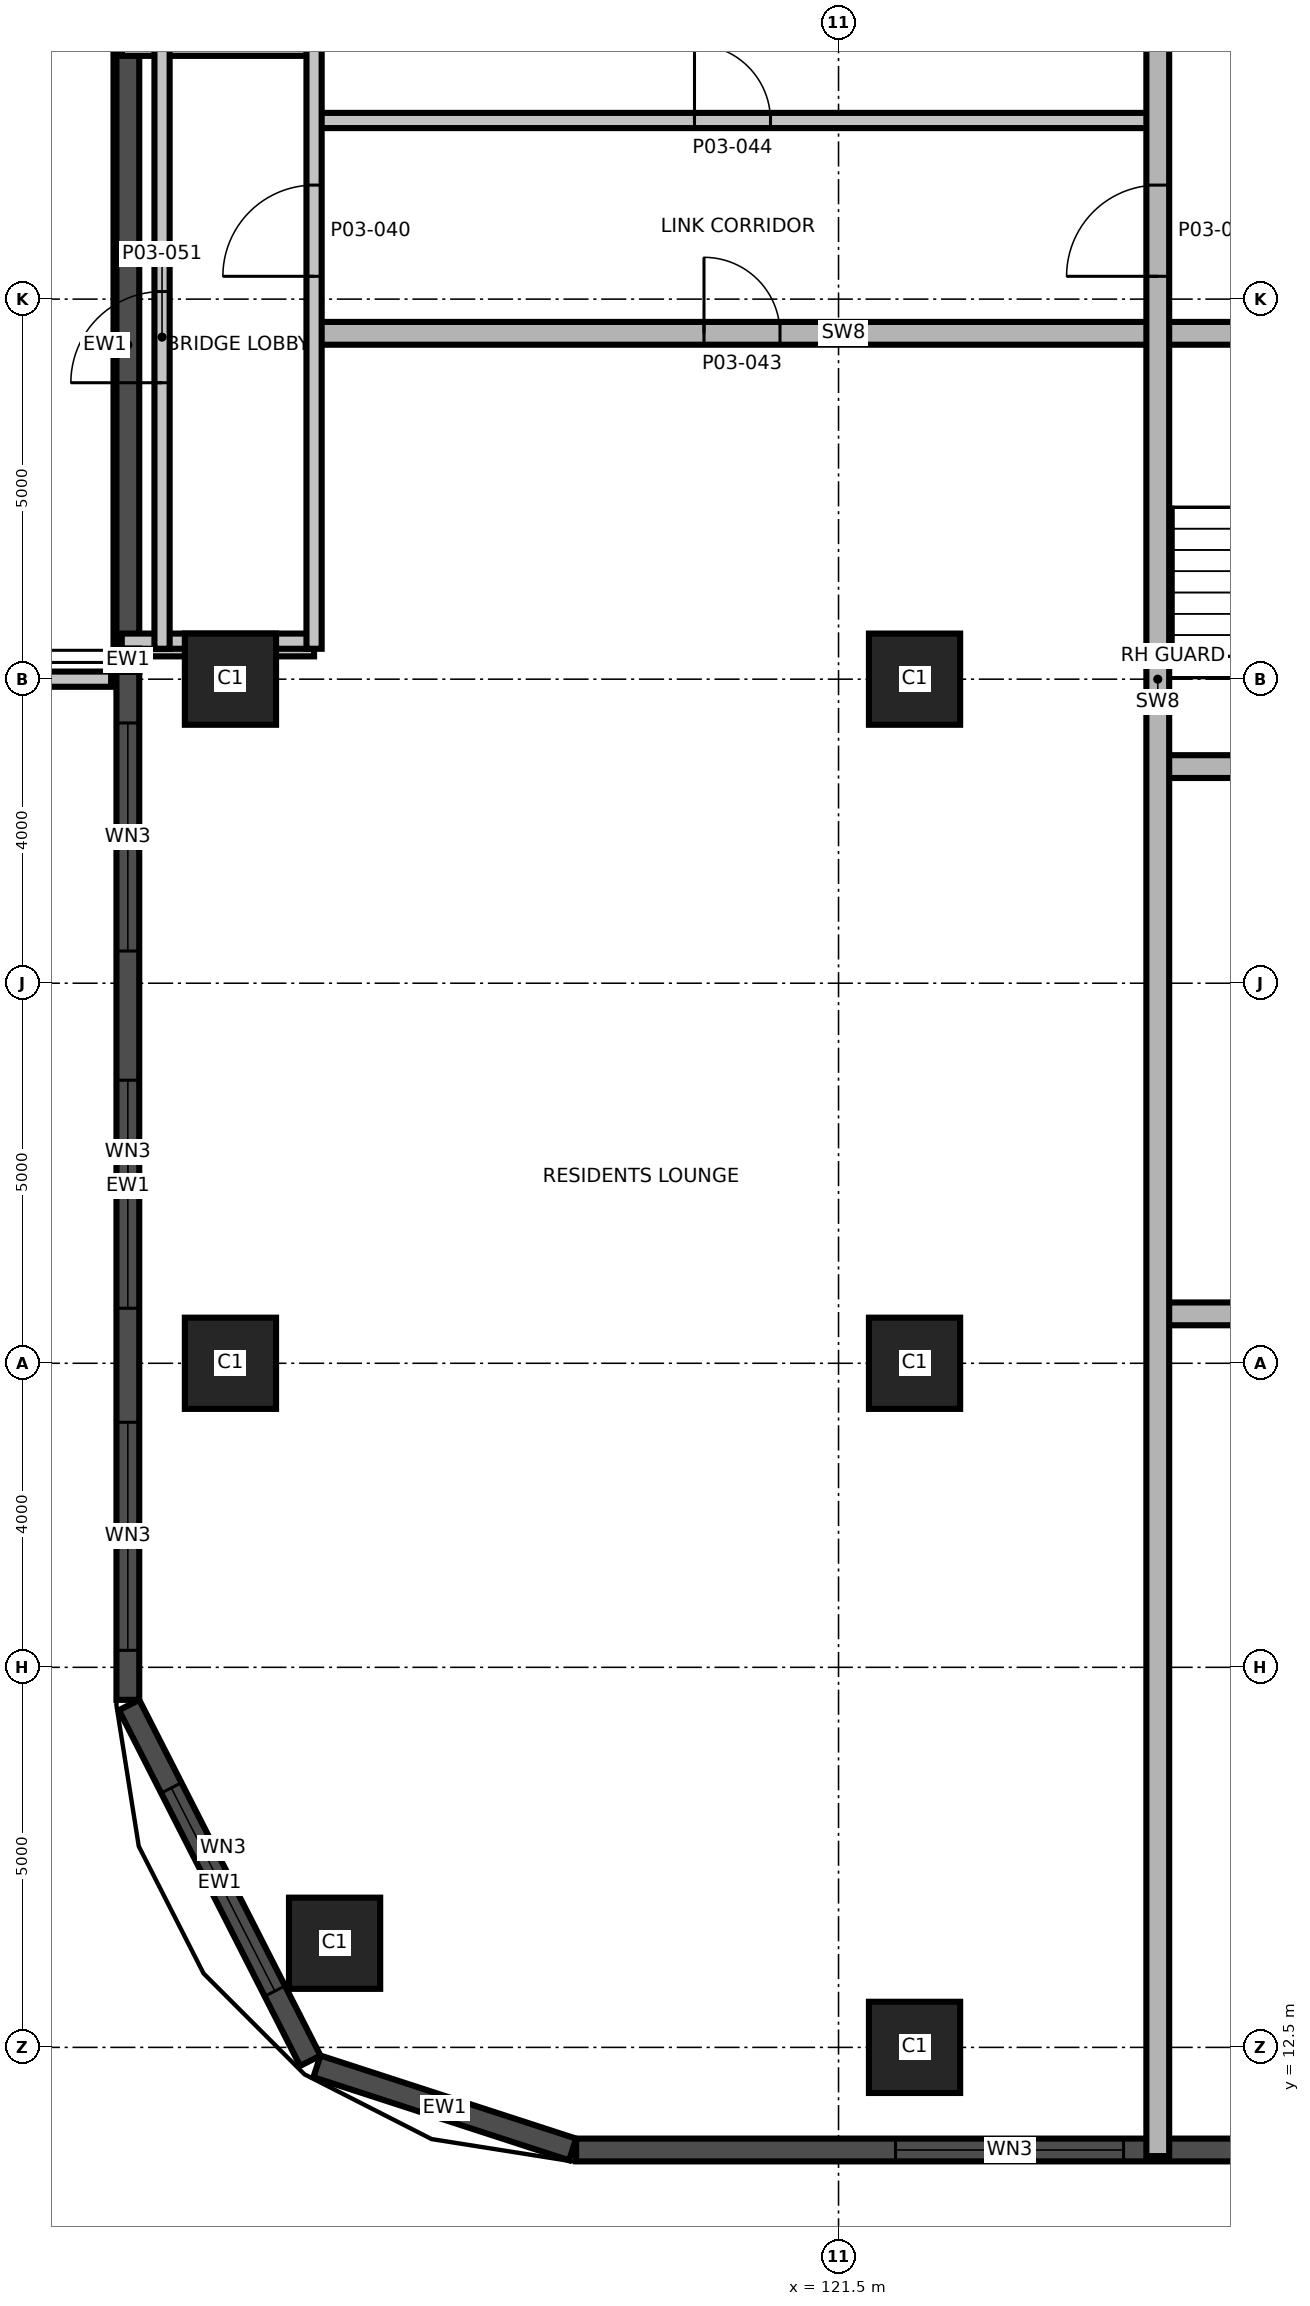
"""IFC4 building model, lengths in metres.
Left out: names, types, materials, properties, quantities, classifications, styles, units other than length and angle.
Written with IfcOpenShell. Run it as: python <this file> out.ifc"""

import sys

from ifc_helpers import new_model, si_unit, direction, frame, frame_2d, origin, origin_2d, place, context, subcontext, project, spatial, rectangle, extrude, element, fill, save


model = new_model("IFC4")
c1 = context("Model", 3, precision=1e-05, world=origin(), true_north=direction((0.0, 1.0)))
c2 = subcontext(c1, "Body", "Model", "MODEL_VIEW")
j1 = project(units=[si_unit("LENGTHUNIT", "METRE"), si_unit("PLANEANGLEUNIT", "RADIAN")], contexts=[c1])
p1 = place(None, origin())
s1 = spatial("IfcSite", under=j1, at=p1, CompositionType="ELEMENT")
p2 = place(p1, origin())
s2 = spatial("IfcBuilding", under=s1, at=p2, CompositionType="ELEMENT")
p3 = place(p2, frame((0.0, 0.0, 18.5)))
s3 = spatial("IfcBuildingStorey", under=s2, at=p3, CompositionType="ELEMENT", Elevation=18.5)
for number, where, z_axis, x_axis in (
    (1, (122.5, 12.5, 0.0), (0.0, 0.0, 1.0), (1.0, 0.0, 0.0)),
    (2, (114.87, 13.87, 0.0), (0.0, 0.0, 1.0), (1.0, 0.0, 0.0)),
    (3, (113.5, 21.5, 0.0), (0.0, 0.0, 1.0), (1.0, 0.0, 0.0)),
    (4, (122.5, 21.5, 0.0), (0.0, 0.0, 1.0), (1.0, 0.0, 0.0)),
    (5, (113.5, 30.5, 0.0), (0.0, 0.0, 1.0), (1.0, 0.0, 0.0)),
    (6, (122.5, 30.5, 0.0), (0.0, 0.0, 1.0), (1.0, 0.0, 0.0)),
):
    element("IfcColumn", number, at=place(p3, frame(where, z_axis=z_axis, x_axis=x_axis)), inside=s3, PredefinedType="COLUMN", context=c2, shape_type="SweptSolid", body=[
        extrude(rectangle(XDim=1.2, YDim=1.2, at=origin_2d()), origin(), (0.0, 0.0, 1.0), 5.0),
    ])
p4 = place(p3, frame((112.166, 17.004, 0.0), z_axis=(0.0, 0.0, 1.0), x_axis=(0.454006562826, -0.890998339455, 0.0)))
e7 = element("IfcWall", 7, at=p4, inside=s3, PredefinedType="SOLIDWALL", context=c2, shape_type="SweptSolid", body=[
    extrude(rectangle(XDim=5.252, YDim=0.3, at=frame_2d((2.626, 0.0))), origin(), (0.0, 0.0, 1.0), 4.7),
])
p5 = place(p4, frame((1.224, 0.0, 0.9)))
e8 = element("IfcOpeningElement", 8, at=p5, cuts=e7, PredefinedType="OPENING", context=c2, shape_type="SweptSolid", body=[
    extrude(rectangle(XDim=3.0, YDim=2.4, at=frame_2d((1.5, 1.2))), frame((0.0, 0.16, 0.0), z_axis=(0.0, -1.0, 0.0), x_axis=(1.0, 0.0, 0.0)), (0.0, 0.0, 1.0), 0.32),
])
p6 = place(p3, frame((114.638, 12.25, 0.0), z_axis=(0.0, 0.0, 1.0), x_axis=(0.951038127287, -0.309073584194, 0.0)))
e9 = element("IfcWall", 9, at=p6, inside=s3, PredefinedType="SOLIDWALL", context=c2, shape_type="SweptSolid", body=[
    extrude(rectangle(XDim=3.536, YDim=0.3, at=frame_2d((1.768, 0.0))), origin(), (0.0, 0.0, 1.0), 4.7),
])
p7 = place(p3, frame((118.048, 11.15, 0.0), z_axis=(0.0, 0.0, 1.0), x_axis=(1.0, 0.0, 0.0)))
e10 = element("IfcWall", 10, at=p7, inside=s3, PredefinedType="SOLIDWALL", context=c2, shape_type="SweptSolid", body=[
    extrude(rectangle(XDim=35.88, YDim=0.3, at=frame_2d((17.94, 0.0))), origin(), (0.0, 0.0, 1.0), 4.7),
])
p8 = place(p7, frame((4.202, 0.0, 0.9)))
e11 = element("IfcOpeningElement", 11, at=p8, cuts=e10, PredefinedType="OPENING", context=c2, shape_type="SweptSolid", body=[
    extrude(rectangle(XDim=3.0, YDim=2.4, at=frame_2d((1.5, 1.2))), frame((0.0, 0.16, 0.0), z_axis=(0.0, -1.0, 0.0), x_axis=(1.0, 0.0, 0.0)), (0.0, 0.0, 1.0), 0.32),
])
p9 = place(p7, frame((8.702, 0.0, 0.9)))
e12 = element("IfcOpeningElement", 12, at=p9, cuts=e10, PredefinedType="OPENING", context=c2, shape_type="SweptSolid", body=[
    extrude(rectangle(XDim=3.0, YDim=2.4, at=frame_2d((1.5, 1.2))), frame((0.0, 0.16, 0.0), z_axis=(0.0, -1.0, 0.0), x_axis=(1.0, 0.0, 0.0)), (0.0, 0.0, 1.0), 0.32),
])
p10 = place(p7, frame((13.202, 0.0, 0.9)))
e13 = element("IfcOpeningElement", 13, at=p10, cuts=e10, PredefinedType="OPENING", context=c2, shape_type="SweptSolid", body=[
    extrude(rectangle(XDim=3.0, YDim=2.4, at=frame_2d((1.5, 1.2))), frame((0.0, 0.16, 0.0), z_axis=(0.0, -1.0, 0.0), x_axis=(1.0, 0.0, 0.0)), (0.0, 0.0, 1.0), 0.32),
])
p11 = place(p7, frame((17.702, 0.0, 0.9)))
e14 = element("IfcOpeningElement", 14, at=p11, cuts=e10, PredefinedType="OPENING", context=c2, shape_type="SweptSolid", body=[
    extrude(rectangle(XDim=3.0, YDim=2.4, at=frame_2d((1.5, 1.2))), frame((0.0, 0.16, 0.0), z_axis=(0.0, -1.0, 0.0), x_axis=(1.0, 0.0, 0.0)), (0.0, 0.0, 1.0), 0.32),
])
p12 = place(p7, frame((22.202, 0.0, 0.9)))
e15 = element("IfcOpeningElement", 15, at=p12, cuts=e10, PredefinedType="OPENING", context=c2, shape_type="SweptSolid", body=[
    extrude(rectangle(XDim=3.0, YDim=2.4, at=frame_2d((1.5, 1.2))), frame((0.0, 0.16, 0.0), z_axis=(0.0, -1.0, 0.0), x_axis=(1.0, 0.0, 0.0)), (0.0, 0.0, 1.0), 0.32),
])
p13 = place(p7, frame((31.726, 0.0, 0.9)))
e16 = element("IfcOpeningElement", 16, at=p13, cuts=e10, PredefinedType="OPENING", context=c2, shape_type="SweptSolid", body=[
    extrude(rectangle(XDim=3.0, YDim=2.4, at=frame_2d((1.5, 1.2))), frame((0.0, 0.16, 0.0), z_axis=(0.0, -1.0, 0.0), x_axis=(1.0, 0.0, 0.0)), (0.0, 0.0, 1.0), 0.32),
])
p14 = place(p3, frame((112.15, 38.9, 3.15), z_axis=(0.0, 0.0, 1.0), x_axis=(0.0, -1.0, 0.0)))
e17 = element("IfcWall", 17, at=p14, inside=s3, PredefinedType="SOLIDWALL", context=c2, shape_type="SweptSolid", body=[
    extrude(rectangle(XDim=8.0, YDim=0.3, at=frame_2d((4.0, 0.0))), origin(), (0.0, 0.0, 1.0), 1.55),
])
p15 = place(p3, frame((112.15, 30.6, 0.0), z_axis=(0.0, 0.0, 1.0), x_axis=(0.0, -1.0, 0.0)))
e18 = element("IfcWall", 18, at=p15, inside=s3, PredefinedType="SOLIDWALL", context=c2, shape_type="SweptSolid", body=[
    extrude(rectangle(XDim=13.528, YDim=0.3, at=frame_2d((6.764, 0.0))), origin(), (0.0, 0.0, 1.0), 4.7),
])
p16 = place(p15, frame((0.676, 0.0, 0.9)))
e19 = element("IfcOpeningElement", 19, at=p16, cuts=e18, PredefinedType="OPENING", context=c2, shape_type="SweptSolid", body=[
    extrude(rectangle(XDim=3.0, YDim=2.4, at=frame_2d((1.5, 1.2))), frame((0.0, 0.16, 0.0), z_axis=(0.0, -1.0, 0.0), x_axis=(1.0, 0.0, 0.0)), (0.0, 0.0, 1.0), 0.32),
])
p17 = place(p15, frame((5.376, 0.0, 0.9)))
e20 = element("IfcOpeningElement", 20, at=p17, cuts=e18, PredefinedType="OPENING", context=c2, shape_type="SweptSolid", body=[
    extrude(rectangle(XDim=3.0, YDim=2.4, at=frame_2d((1.5, 1.2))), frame((0.0, 0.16, 0.0), z_axis=(0.0, -1.0, 0.0), x_axis=(1.0, 0.0, 0.0)), (0.0, 0.0, 1.0), 0.32),
])
p18 = place(p15, frame((9.876, 0.0, 0.9)))
e21 = element("IfcOpeningElement", 21, at=p18, cuts=e18, PredefinedType="OPENING", context=c2, shape_type="SweptSolid", body=[
    extrude(rectangle(XDim=3.0, YDim=2.4, at=frame_2d((1.5, 1.2))), frame((0.0, 0.16, 0.0), z_axis=(0.0, -1.0, 0.0), x_axis=(1.0, 0.0, 0.0)), (0.0, 0.0, 1.0), 0.32),
])
p19 = place(p3, frame((125.75, 22.15, 0.0), z_axis=(0.0, 0.0, 1.0), x_axis=(1.0, 0.0, 0.0)))
e22 = element("IfcWall", 22, at=p19, inside=s3, PredefinedType="SHEAR", context=c2, shape_type="SweptSolid", body=[
    extrude(rectangle(XDim=21.5, YDim=0.3, at=frame_2d((10.75, 0.0))), origin(), (0.0, 0.0, 1.0), 4.7),
])
p20 = place(p19, frame((17.0, 0.0, 0.0)))
e23 = element("IfcOpeningElement", 23, at=p20, cuts=e22, PredefinedType="OPENING", context=c2, shape_type="SweptSolid", body=[
    extrude(rectangle(XDim=1.0, YDim=2.1, at=frame_2d((0.5, 1.05))), frame((0.0, 0.16, 0.0), z_axis=(0.0, -1.0, 0.0), x_axis=(1.0, 0.0, 0.0)), (0.0, 0.0, 1.0), 0.32),
])
p21 = place(p19, frame((6.75, 0.0, 0.0)))
e24 = element("IfcOpeningElement", 24, at=p21, cuts=e22, PredefinedType="OPENING", context=c2, shape_type="SweptSolid", body=[
    extrude(rectangle(XDim=1.6, YDim=2.1, at=frame_2d((0.8, 1.05))), frame((0.0, 0.16, 0.0), z_axis=(0.0, -1.0, 0.0), x_axis=(1.0, 0.0, 0.0)), (0.0, 0.0, 1.0), 0.32),
])
p22 = place(p3, frame((125.7, 29.35, 0.0), z_axis=(0.0, 0.0, 1.0), x_axis=(1.0, 0.0, 0.0)))
e25 = element("IfcWall", 25, at=p22, inside=s3, PredefinedType="SHEAR", context=c2, shape_type="SweptSolid", body=[
    extrude(rectangle(XDim=2.83, YDim=0.3, at=frame_2d((1.415, 0.0))), origin(), (0.0, 0.0, 1.0), 4.7),
])
p23 = place(p22, frame((0.975, 0.0, 0.0)))
e26 = element("IfcOpeningElement", 26, at=p23, cuts=e25, PredefinedType="OPENING", context=c2, shape_type="SweptSolid", body=[
    extrude(rectangle(XDim=1.2, YDim=2.1, at=frame_2d((0.6, 1.05))), frame((0.0, 0.16, 0.0), z_axis=(0.0, -1.0, 0.0), x_axis=(1.0, 0.0, 0.0)), (0.0, 0.0, 1.0), 0.32),
])
p24 = place(p3, frame((105.07, 30.5, 0.0), z_axis=(0.0, 0.0, 1.0), x_axis=(1.0, 0.0, 0.0)))
e27 = element("IfcWall", 27, at=p24, inside=s3, PredefinedType="PARTITIONING", context=c2, shape_type="SweptSolid", body=[
    extrude(rectangle(XDim=6.86, YDim=0.2, at=frame_2d((3.43, 0.0))), origin(), (0.0, 0.0, 1.0), 4.7),
])
p25 = place(p3, frame((112.1, 30.9, 0.0), z_axis=(0.0, 0.0, 1.0), x_axis=(1.0, 0.0, 0.0)))
e28 = element("IfcWall", 28, at=p25, inside=s3, PredefinedType="PARTITIONING", context=c2, shape_type="SweptSolid", body=[
    extrude(rectangle(XDim=2.5, YDim=0.2, at=frame_2d((1.25, 0.0))), origin(), (0.0, 0.0, 1.0), 2.7),
])
p26 = place(p3, frame((112.07, 31.0, 0.0), z_axis=(0.0, 0.0, 1.0), x_axis=(1.0, 0.0, 0.0)))
e29 = element("IfcWall", 29, at=p26, inside=s3, PredefinedType="PARTITIONING", context=c2, shape_type="SweptSolid", body=[
    extrude(rectangle(XDim=2.53, YDim=0.2, at=frame_2d((1.265, 0.0))), origin(), (0.0, 0.0, 1.0), 4.7),
])
p27 = place(p3, frame((114.6, 35.05, 0.0), z_axis=(0.0, 0.0, 1.0), x_axis=(1.0, 0.0, 0.0)))
e30 = element("IfcWall", 30, at=p27, inside=s3, PredefinedType="SHEAR", context=c2, shape_type="SweptSolid", body=[
    extrude(rectangle(XDim=13.93, YDim=0.3, at=frame_2d((6.965, 0.0))), origin(), (0.0, 0.0, 1.0), 4.7),
])
p28 = place(p27, frame((5.13, 0.0, 0.0)))
e31 = element("IfcOpeningElement", 31, at=p28, cuts=e30, PredefinedType="OPENING", context=c2, shape_type="SweptSolid", body=[
    extrude(rectangle(XDim=1.0, YDim=2.1, at=frame_2d((0.5, 1.05))), frame((0.0, 0.16, 0.0), z_axis=(0.0, -1.0, 0.0), x_axis=(1.0, 0.0, 0.0)), (0.0, 0.0, 1.0), 0.32),
])
p29 = place(p3, frame((114.6, 37.85, 0.0), z_axis=(0.0, 0.0, 1.0), x_axis=(1.0, 0.0, 0.0)))
e32 = element("IfcWall", 32, at=p29, inside=s3, PredefinedType="PARTITIONING", context=c2, shape_type="SweptSolid", body=[
    extrude(rectangle(XDim=11.15, YDim=0.2, at=frame_2d((5.575, 0.0))), origin(), (0.0, 0.0, 1.0), 4.7),
])
p30 = place(p29, frame((5.005, 0.0, 0.0)))
e33 = element("IfcOpeningElement", 33, at=p30, cuts=e32, PredefinedType="OPENING", context=c2, shape_type="SweptSolid", body=[
    extrude(rectangle(XDim=1.0, YDim=2.1, at=frame_2d((0.5, 1.05))), frame((0.0, 0.11, 0.0), z_axis=(0.0, -1.0, 0.0), x_axis=(1.0, 0.0, 0.0)), (0.0, 0.0, 1.0), 0.22),
])
p31 = place(p3, frame((112.07, 38.8, 0.0), z_axis=(0.0, 0.0, 1.0), x_axis=(1.0, 0.0, 0.0)))
e34 = element("IfcWall", 34, at=p31, inside=s3, PredefinedType="PARTITIONING", context=c2, shape_type="SweptSolid", body=[
    extrude(rectangle(XDim=2.53, YDim=0.2, at=frame_2d((1.265, 0.0))), origin(), (0.0, 0.0, 1.0), 4.7),
])
p32 = place(p3, frame((112.6, 30.9, 0.0), z_axis=(0.0, 0.0, 1.0), x_axis=(0.0, 1.0, 0.0)))
e35 = element("IfcWall", 35, at=p32, inside=s3, PredefinedType="PARTITIONING", context=c2, shape_type="SweptSolid", body=[
    extrude(rectangle(XDim=8.0, YDim=0.2, at=frame_2d((4.0, 0.0))), origin(), (0.0, 0.0, 1.0), 4.7),
])
p33 = place(p32, frame((3.5, 0.0, 0.0)))
e36 = element("IfcOpeningElement", 36, at=p33, cuts=e35, PredefinedType="OPENING", context=c2, shape_type="SweptSolid", body=[
    extrude(rectangle(XDim=1.2, YDim=2.1, at=frame_2d((0.6, 1.05))), frame((0.0, 0.11, 0.0), z_axis=(0.0, -1.0, 0.0), x_axis=(1.0, 0.0, 0.0)), (0.0, 0.0, 1.0), 0.22),
])
p34 = place(p3, frame((114.6, 30.9, 0.0), z_axis=(0.0, 0.0, 1.0), x_axis=(0.0, 1.0, 0.0)))
e37 = element("IfcWall", 37, at=p34, inside=s3, PredefinedType="PARTITIONING", context=c2, shape_type="SweptSolid", body=[
    extrude(rectangle(XDim=8.0, YDim=0.2, at=frame_2d((4.0, 0.0))), origin(), (0.0, 0.0, 1.0), 4.7),
])
p35 = place(p34, frame((4.9, 0.0, 0.0)))
e38 = element("IfcOpeningElement", 38, at=p35, cuts=e37, PredefinedType="OPENING", context=c2, shape_type="SweptSolid", body=[
    extrude(rectangle(XDim=1.2, YDim=2.1, at=frame_2d((0.6, 1.05))), frame((0.0, 0.11, 0.0), z_axis=(0.0, -1.0, 0.0), x_axis=(1.0, 0.0, 0.0)), (0.0, 0.0, 1.0), 0.22),
])
p36 = place(p3, frame((125.7, 11.07, 0.0), z_axis=(0.0, 0.0, 1.0), x_axis=(0.0, 1.0, 0.0)))
e39 = element("IfcWall", 39, at=p36, inside=s3, PredefinedType="SHEAR", context=c2, shape_type="SweptSolid", body=[
    extrude(rectangle(XDim=38.86, YDim=0.3, at=frame_2d((19.43, 0.0))), origin(), (0.0, 0.0, 1.0), 4.7),
])
p37 = place(p36, frame((24.73, 0.0, 0.0)))
e40 = element("IfcOpeningElement", 40, at=p37, cuts=e39, PredefinedType="OPENING", context=c2, shape_type="SweptSolid", body=[
    extrude(rectangle(XDim=1.2, YDim=2.1, at=frame_2d((0.6, 1.05))), frame((0.0, 0.16, 0.0), z_axis=(0.0, -1.0, 0.0), x_axis=(1.0, 0.0, 0.0)), (0.0, 0.0, 1.0), 0.32),
])
p38 = place(p3, frame((112.15, 30.6, 0.0), z_axis=(0.0, 0.0, 1.0), x_axis=(0.0, 1.0, 0.0)))
e41 = element("IfcWall", 41, at=p38, inside=s3, PredefinedType="SOLIDWALL", context=c2, shape_type="SweptSolid", body=[
    extrude(rectangle(XDim=0.3, YDim=0.3, at=frame_2d((0.15, 0.0))), origin(), (0.0, 0.0, 1.0), 2.7),
])
p39 = place(p3, frame((112.15, 30.6, 3.15), z_axis=(0.0, 0.0, 1.0), x_axis=(0.0, 1.0, 0.0)))
e42 = element("IfcWall", 42, at=p39, inside=s3, PredefinedType="SOLIDWALL", context=c2, shape_type="SweptSolid", body=[
    extrude(rectangle(XDim=0.3, YDim=0.3, at=frame_2d((0.15, 0.0))), origin(), (0.0, 0.0, 1.0), 1.55),
])
p40 = place(p5, origin())
e43 = element("IfcWindow", 43, at=p40, inside=s3, PartitioningType="SINGLE_PANEL", PredefinedType="WINDOW", context=c2, shape_type="SweptSolid", body=[
    extrude(rectangle(XDim=3.0, YDim=2.4, at=frame_2d((1.5, 1.2))), frame((0.0, 0.03, 0.0), z_axis=(0.0, -1.0, 0.0), x_axis=(1.0, 0.0, 0.0)), (0.0, 0.0, 1.0), 0.06),
])
fill(e8, e43)
p41 = place(p8, origin())
e44 = element("IfcWindow", 44, at=p41, inside=s3, PartitioningType="SINGLE_PANEL", PredefinedType="WINDOW", context=c2, shape_type="SweptSolid", body=[
    extrude(rectangle(XDim=3.0, YDim=2.4, at=frame_2d((1.5, 1.2))), frame((0.0, 0.03, 0.0), z_axis=(0.0, -1.0, 0.0), x_axis=(1.0, 0.0, 0.0)), (0.0, 0.0, 1.0), 0.06),
])
fill(e11, e44)
p42 = place(p16, origin())
e45 = element("IfcWindow", 45, at=p42, inside=s3, PartitioningType="SINGLE_PANEL", PredefinedType="WINDOW", context=c2, shape_type="SweptSolid", body=[
    extrude(rectangle(XDim=3.0, YDim=2.4, at=frame_2d((1.5, 1.2))), frame((0.0, 0.03, 0.0), z_axis=(0.0, -1.0, 0.0), x_axis=(1.0, 0.0, 0.0)), (0.0, 0.0, 1.0), 0.06),
])
fill(e19, e45)
p43 = place(p17, origin())
e46 = element("IfcWindow", 46, at=p43, inside=s3, PartitioningType="SINGLE_PANEL", PredefinedType="WINDOW", context=c2, shape_type="SweptSolid", body=[
    extrude(rectangle(XDim=3.0, YDim=2.4, at=frame_2d((1.5, 1.2))), frame((0.0, 0.03, 0.0), z_axis=(0.0, -1.0, 0.0), x_axis=(1.0, 0.0, 0.0)), (0.0, 0.0, 1.0), 0.06),
])
fill(e20, e46)
p44 = place(p18, origin())
e47 = element("IfcWindow", 47, at=p44, inside=s3, PartitioningType="SINGLE_PANEL", PredefinedType="WINDOW", context=c2, shape_type="SweptSolid", body=[
    extrude(rectangle(XDim=3.0, YDim=2.4, at=frame_2d((1.5, 1.2))), frame((0.0, 0.03, 0.0), z_axis=(0.0, -1.0, 0.0), x_axis=(1.0, 0.0, 0.0)), (0.0, 0.0, 1.0), 0.06),
])
fill(e21, e47)
p45 = place(p35, origin())
e48 = element("IfcDoor", 48, at=p45, inside=s3, OperationType="SINGLE_SWING_RIGHT", PredefinedType="DOOR", context=c2, shape_type="SweptSolid", body=[
    extrude(rectangle(XDim=1.2, YDim=2.1, at=frame_2d((0.6, 1.05))), frame((0.0, 0.025, 0.0), z_axis=(0.0, -1.0, 0.0), x_axis=(1.0, 0.0, 0.0)), (0.0, 0.0, 1.0), 0.05),
])
fill(e38, e48)
p46 = place(p37, origin())
e49 = element("IfcDoor", 49, at=p46, inside=s3, OperationType="SINGLE_SWING_LEFT", PredefinedType="DOOR", context=c2, shape_type="SweptSolid", body=[
    extrude(rectangle(XDim=1.2, YDim=2.1, at=frame_2d((0.6, 1.05))), frame((0.0, 0.025, 0.0), z_axis=(0.0, -1.0, 0.0), x_axis=(1.0, 0.0, 0.0)), (0.0, 0.0, 1.0), 0.05),
])
fill(e40, e49)
p47 = place(p28, origin())
e50 = element("IfcDoor", 50, at=p47, inside=s3, OperationType="SINGLE_SWING_LEFT", PredefinedType="DOOR", context=c2, shape_type="SweptSolid", body=[
    extrude(rectangle(XDim=1.0, YDim=2.1, at=frame_2d((0.5, 1.05))), frame((0.0, 0.025, 0.0), z_axis=(0.0, -1.0, 0.0), x_axis=(1.0, 0.0, 0.0)), (0.0, 0.0, 1.0), 0.05),
])
fill(e31, e50)
p48 = place(p30, origin())
e51 = element("IfcDoor", 51, at=p48, inside=s3, OperationType="SINGLE_SWING_RIGHT", PredefinedType="DOOR", context=c2, shape_type="SweptSolid", body=[
    extrude(rectangle(XDim=1.0, YDim=2.1, at=frame_2d((0.5, 1.05))), frame((0.0, 0.025, 0.0), z_axis=(0.0, -1.0, 0.0), x_axis=(1.0, 0.0, 0.0)), (0.0, 0.0, 1.0), 0.05),
])
fill(e33, e51)
p49 = place(p33, origin())
e52 = element("IfcDoor", 52, at=p49, inside=s3, OperationType="SINGLE_SWING_LEFT", PredefinedType="DOOR", context=c2, shape_type="SweptSolid", body=[
    extrude(rectangle(XDim=1.2, YDim=2.1, at=frame_2d((0.6, 1.05))), frame((0.0, 0.025, 0.0), z_axis=(0.0, -1.0, 0.0), x_axis=(1.0, 0.0, 0.0)), (0.0, 0.0, 1.0), 0.05),
])
fill(e36, e52)
save(model, sys.argv[1])
